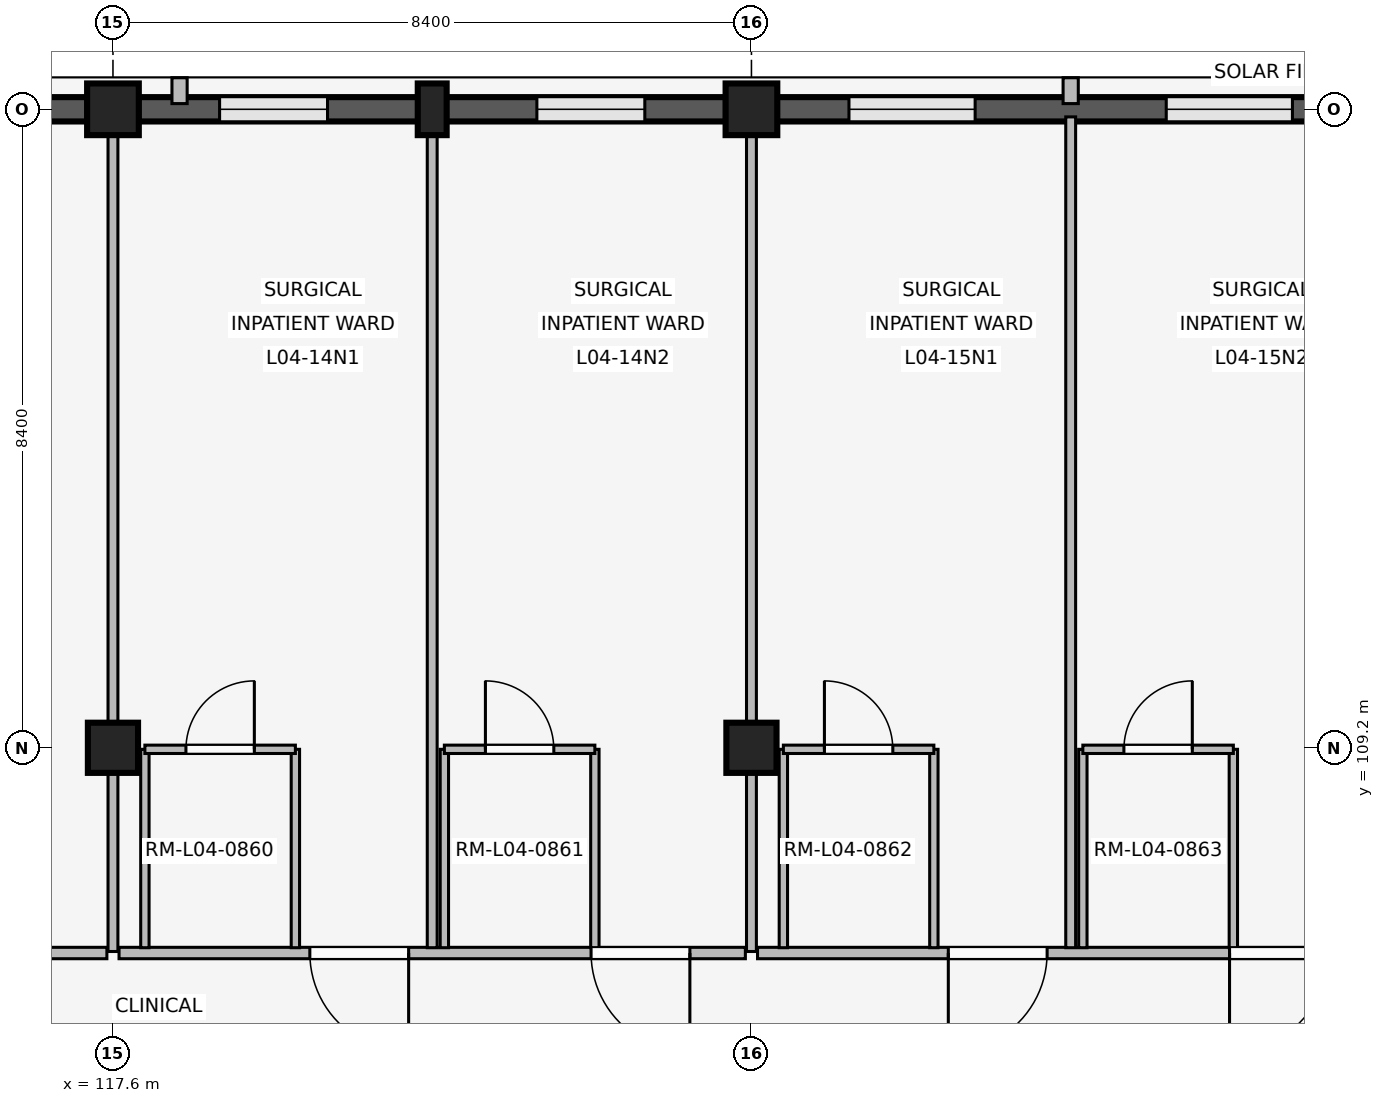
"""IFC4 building model, lengths in metres.
Left out: names, types, materials, properties, quantities, classifications, styles, units other than length and angle.
Written with IfcOpenShell. Run it as: python <this file> out.ifc"""

import sys

from ifc_helpers import new_model, si_unit, direction, frame, frame_2d, origin, origin_2d, place, context, subcontext, project, spatial, rectangle, extrude, element, fill, save


model = new_model("IFC4")
c1 = context("Model", 3, precision=1e-05, world=origin(), true_north=direction((0.0, 1.0)))
c2 = subcontext(c1, "Body", "Model", "MODEL_VIEW")
j1 = project(units=[si_unit("LENGTHUNIT", "METRE"), si_unit("PLANEANGLEUNIT", "RADIAN")], contexts=[c1])
p1 = place(None, origin())
s1 = spatial("IfcSite", under=j1, at=p1, CompositionType="ELEMENT")
p2 = place(p1, origin())
s2 = spatial("IfcBuilding", under=s1, at=p2, CompositionType="ELEMENT")
p3 = place(p2, frame((0.0, 0.0, 16.2)))
s3 = spatial("IfcBuildingStorey", under=s2, at=p3, CompositionType="ELEMENT", Elevation=16.2)
p4 = place(p3, frame((117.6, 109.2, 0.0), z_axis=(0.0, 0.0, 1.0), x_axis=(1.0, 0.0, 0.0)))
e1 = element("IfcColumn", 1, at=p4, inside=s3, PredefinedType="COLUMN", context=c2, shape_type="SweptSolid", body=[
    extrude(rectangle(XDim=0.66, YDim=0.66, at=origin_2d()), origin(), (0.0, 0.0, 1.0), 4.2),
])
p5 = place(p3, frame((117.6, 117.6, 0.0), z_axis=(0.0, 0.0, 1.0), x_axis=(1.0, 0.0, 0.0)))
e2 = element("IfcColumn", 2, at=p5, inside=s3, PredefinedType="COLUMN", context=c2, shape_type="SweptSolid", body=[
    extrude(rectangle(XDim=0.68, YDim=0.68, at=origin_2d()), origin(), (0.0, 0.0, 1.0), 4.2),
])
p6 = place(p3, frame((126.0, 109.2, 0.0), z_axis=(0.0, 0.0, 1.0), x_axis=(1.0, 0.0, 0.0)))
e3 = element("IfcColumn", 3, at=p6, inside=s3, PredefinedType="COLUMN", context=c2, shape_type="SweptSolid", body=[
    extrude(rectangle(XDim=0.66, YDim=0.66, at=origin_2d()), origin(), (0.0, 0.0, 1.0), 4.2),
])
p7 = place(p3, frame((126.0, 117.6, 0.0), z_axis=(0.0, 0.0, 1.0), x_axis=(1.0, 0.0, 0.0)))
e4 = element("IfcColumn", 4, at=p7, inside=s3, PredefinedType="COLUMN", context=c2, shape_type="SweptSolid", body=[
    extrude(rectangle(XDim=0.68, YDim=0.68, at=origin_2d()), origin(), (0.0, 0.0, 1.0), 4.2),
])
p8 = place(p3, frame((121.8, 117.6, 0.0), z_axis=(0.0, 0.0, 1.0), x_axis=(1.0, 0.0, 0.0)))
e5 = element("IfcColumn", 5, at=p8, inside=s3, PredefinedType="PILASTER", context=c2, shape_type="SweptSolid", body=[
    extrude(rectangle(XDim=0.38, YDim=0.68, at=origin_2d()), origin(), (0.0, 0.0, 1.0), 4.2),
])
p9 = place(p3, frame((109.535, 117.6, 0.0), z_axis=(0.0, 0.0, 1.0), x_axis=(1.0, 0.0, 0.0)))
e6 = element("IfcWall", 6, at=p9, inside=s3, PredefinedType="SOLIDWALL", context=c2, shape_type="SweptSolid", body=[
    extrude(rectangle(XDim=7.73, YDim=0.32, at=frame_2d((3.865, 0.0))), origin(), (0.0, 0.0, 1.0), 3.32),
])
p10 = place(p9, frame((1.038, 0.0, 0.85)))
e7 = element("IfcOpeningElement", 7, at=p10, cuts=e6, PredefinedType="OPENING", context=c2, shape_type="SweptSolid", body=[
    extrude(rectangle(XDim=1.48, YDim=1.6, at=frame_2d((0.74, 0.8))), frame((0.0, 0.17, 0.0), z_axis=(0.0, -1.0, 0.0), x_axis=(1.0, 0.0, 0.0)), (0.0, 0.0, 1.0), 0.34),
])
p11 = place(p9, frame((5.212, 0.0, 0.85)))
e8 = element("IfcOpeningElement", 8, at=p11, cuts=e6, PredefinedType="OPENING", context=c2, shape_type="SweptSolid", body=[
    extrude(rectangle(XDim=1.48, YDim=1.6, at=frame_2d((0.74, 0.8))), frame((0.0, 0.17, 0.0), z_axis=(0.0, -1.0, 0.0), x_axis=(1.0, 0.0, 0.0)), (0.0, 0.0, 1.0), 0.34),
])
p12 = place(p3, frame((117.935, 117.6, 0.0), z_axis=(0.0, 0.0, 1.0), x_axis=(1.0, 0.0, 0.0)))
e9 = element("IfcWall", 9, at=p12, inside=s3, PredefinedType="SOLIDWALL", context=c2, shape_type="SweptSolid", body=[
    extrude(rectangle(XDim=7.73, YDim=0.32, at=frame_2d((3.865, 0.0))), origin(), (0.0, 0.0, 1.0), 3.32),
])
p13 = place(p12, frame((1.068, 0.0, 0.85)))
e10 = element("IfcOpeningElement", 10, at=p13, cuts=e9, PredefinedType="OPENING", context=c2, shape_type="SweptSolid", body=[
    extrude(rectangle(XDim=1.42, YDim=1.45, at=frame_2d((0.71, 0.725))), frame((0.0, 0.17, 0.0), z_axis=(0.0, -1.0, 0.0), x_axis=(1.0, 0.0, 0.0)), (0.0, 0.0, 1.0), 0.34),
])
p14 = place(p12, frame((5.242, 0.0, 0.85)))
e11 = element("IfcOpeningElement", 11, at=p14, cuts=e9, PredefinedType="OPENING", context=c2, shape_type="SweptSolid", body=[
    extrude(rectangle(XDim=1.42, YDim=1.45, at=frame_2d((0.71, 0.725))), frame((0.0, 0.17, 0.0), z_axis=(0.0, -1.0, 0.0), x_axis=(1.0, 0.0, 0.0)), (0.0, 0.0, 1.0), 0.34),
])
p15 = place(p3, frame((118.476, 117.675, 0.0), z_axis=(0.0, 0.0, 1.0), x_axis=(0.0, 1.0, 0.0)))
e12 = element("IfcWall", 12, at=p15, inside=s3, PredefinedType="ELEMENTEDWALL", context=c2, shape_type="SweptSolid", body=[
    extrude(rectangle(XDim=0.34, YDim=0.2, at=frame_2d((0.17, 0.0))), origin(), (0.0, 0.0, 1.0), 3.3),
])
p16 = place(p3, frame((126.335, 117.6, 0.0), z_axis=(0.0, 0.0, 1.0), x_axis=(1.0, 0.0, 0.0)))
e13 = element("IfcWall", 13, at=p16, inside=s3, PredefinedType="SOLIDWALL", context=c2, shape_type="SweptSolid", body=[
    extrude(rectangle(XDim=7.73, YDim=0.32, at=frame_2d((3.865, 0.0))), origin(), (0.0, 0.0, 1.0), 3.32),
])
p17 = place(p16, frame((0.948, 0.0, 0.85)))
e14 = element("IfcOpeningElement", 14, at=p17, cuts=e13, PredefinedType="OPENING", context=c2, shape_type="SweptSolid", body=[
    extrude(rectangle(XDim=1.66, YDim=1.95, at=frame_2d((0.83, 0.975))), frame((0.0, 0.17, 0.0), z_axis=(0.0, -1.0, 0.0), x_axis=(1.0, 0.0, 0.0)), (0.0, 0.0, 1.0), 0.34),
])
p18 = place(p16, frame((5.122, 0.0, 0.85)))
e15 = element("IfcOpeningElement", 15, at=p18, cuts=e13, PredefinedType="OPENING", context=c2, shape_type="SweptSolid", body=[
    extrude(rectangle(XDim=1.66, YDim=1.95, at=frame_2d((0.83, 0.975))), frame((0.0, 0.17, 0.0), z_axis=(0.0, -1.0, 0.0), x_axis=(1.0, 0.0, 0.0)), (0.0, 0.0, 1.0), 0.34),
])
p19 = place(p3, frame((130.2, 117.675, 0.0), z_axis=(0.0, 0.0, 1.0), x_axis=(0.0, 1.0, 0.0)))
e16 = element("IfcWall", 16, at=p19, inside=s3, PredefinedType="ELEMENTEDWALL", context=c2, shape_type="SweptSolid", body=[
    extrude(rectangle(XDim=0.34, YDim=0.2, at=frame_2d((0.17, 0.0))), origin(), (0.0, 0.0, 1.0), 3.3),
])
p20 = place(p3, frame((117.52, 106.5, 0.0), z_axis=(0.0, 0.0, 1.0), x_axis=(-1.0, 0.0, 0.0)))
e17 = element("IfcWall", 17, at=p20, inside=s3, PredefinedType="PARTITIONING", context=c2, shape_type="SweptSolid", body=[
    extrude(rectangle(XDim=8.24, YDim=0.15, at=frame_2d((4.12, 0.0))), origin(), (0.0, 0.0, 1.0), 3.3),
])
p21 = place(p20, frame((3.495, 0.0, 0.0)))
e18 = element("IfcOpeningElement", 18, at=p21, cuts=e17, PredefinedType="OPENING", context=c2, shape_type="SweptSolid", body=[
    extrude(rectangle(XDim=1.25, YDim=2.2, at=frame_2d((0.625, 1.1))), frame((0.0, 0.085, 0.0), z_axis=(0.0, -1.0, 0.0), x_axis=(1.0, 0.0, 0.0)), (0.0, 0.0, 1.0), 0.17),
])
p22 = place(p3, frame((117.6, 106.52, 0.0), z_axis=(0.0, 0.0, 1.0), x_axis=(0.0, 1.0, 0.0)))
e19 = element("IfcWall", 19, at=p22, inside=s3, PredefinedType="PARTITIONING", context=c2, shape_type="SweptSolid", body=[
    extrude(rectangle(XDim=10.94, YDim=0.13, at=frame_2d((5.47, 0.0))), origin(), (0.0, 0.0, 1.0), 3.3),
])
p23 = place(p3, frame((125.92, 106.5, 0.0), z_axis=(0.0, 0.0, 1.0), x_axis=(-1.0, 0.0, 0.0)))
e20 = element("IfcWall", 20, at=p23, inside=s3, PredefinedType="PARTITIONING", context=c2, shape_type="SweptSolid", body=[
    extrude(rectangle(XDim=8.24, YDim=0.15, at=frame_2d((4.12, 0.0))), origin(), (0.0, 0.0, 1.0), 3.3),
])
p24 = place(p23, frame((0.73, 0.0, 0.0)))
e21 = element("IfcOpeningElement", 21, at=p24, cuts=e20, PredefinedType="OPENING", context=c2, shape_type="SweptSolid", body=[
    extrude(rectangle(XDim=1.3, YDim=2.25, at=frame_2d((0.65, 1.125))), frame((0.0, 0.085, 0.0), z_axis=(0.0, -1.0, 0.0), x_axis=(1.0, 0.0, 0.0)), (0.0, 0.0, 1.0), 0.17),
])
p25 = place(p23, frame((4.43, 0.0, 0.0)))
e22 = element("IfcOpeningElement", 22, at=p25, cuts=e20, PredefinedType="OPENING", context=c2, shape_type="SweptSolid", body=[
    extrude(rectangle(XDim=1.3, YDim=2.25, at=frame_2d((0.65, 1.125))), frame((0.0, 0.085, 0.0), z_axis=(0.0, -1.0, 0.0), x_axis=(1.0, 0.0, 0.0)), (0.0, 0.0, 1.0), 0.17),
])
p26 = place(p3, frame((121.8, 106.57, 0.0), z_axis=(0.0, 0.0, 1.0), x_axis=(0.0, 1.0, 0.0)))
e23 = element("IfcWall", 23, at=p26, inside=s3, PredefinedType="PARTITIONING", context=c2, shape_type="SweptSolid", body=[
    extrude(rectangle(XDim=10.93, YDim=0.13, at=frame_2d((5.465, 0.0))), origin(), (0.0, 0.0, 1.0), 3.3),
])
for number, where, z_axis, x_axis in (
    (24, (118.02, 106.57, 0.0), (0.0, 0.0, 1.0), (0.0, 1.0, 0.0)),
    (25, (120.0, 106.57, 0.0), (0.0, 0.0, 1.0), (0.0, 1.0, 0.0)),
):
    element("IfcWall", number, at=place(p3, frame(where, z_axis=z_axis, x_axis=x_axis)), inside=s3, PredefinedType="PARTITIONING", context=c2, shape_type="SweptSolid", body=[
        extrude(rectangle(XDim=2.61, YDim=0.11, at=frame_2d((1.305, 0.0))), origin(), (0.0, 0.0, 1.0), 3.3),
    ])
p27 = place(p3, frame((118.02, 109.18, 0.0), z_axis=(0.0, 0.0, 1.0), x_axis=(1.0, 0.0, 0.0)))
e26 = element("IfcWall", 26, at=p27, inside=s3, PredefinedType="PARTITIONING", context=c2, shape_type="SweptSolid", body=[
    extrude(rectangle(XDim=1.98, YDim=0.11, at=frame_2d((0.99, 0.0))), origin(), (0.0, 0.0, 1.0), 3.3),
])
p28 = place(p27, frame((0.54, 0.0, 0.0)))
e27 = element("IfcOpeningElement", 27, at=p28, cuts=e26, PredefinedType="OPENING", context=c2, shape_type="SweptSolid", body=[
    extrude(rectangle(XDim=0.9, YDim=2.1, at=frame_2d((0.45, 1.05))), frame((0.0, 0.065, 0.0), z_axis=(0.0, -1.0, 0.0), x_axis=(1.0, 0.0, 0.0)), (0.0, 0.0, 1.0), 0.13),
])
for number, where, z_axis, x_axis in (
    (28, (121.96, 106.57, 0.0), (0.0, 0.0, 1.0), (0.0, 1.0, 0.0)),
    (29, (123.94, 106.57, 0.0), (0.0, 0.0, 1.0), (0.0, 1.0, 0.0)),
):
    element("IfcWall", number, at=place(p3, frame(where, z_axis=z_axis, x_axis=x_axis)), inside=s3, PredefinedType="PARTITIONING", context=c2, shape_type="SweptSolid", body=[
        extrude(rectangle(XDim=2.61, YDim=0.11, at=frame_2d((1.305, 0.0))), origin(), (0.0, 0.0, 1.0), 3.3),
    ])
p29 = place(p3, frame((121.96, 109.18, 0.0), z_axis=(0.0, 0.0, 1.0), x_axis=(1.0, 0.0, 0.0)))
e30 = element("IfcWall", 30, at=p29, inside=s3, PredefinedType="PARTITIONING", context=c2, shape_type="SweptSolid", body=[
    extrude(rectangle(XDim=1.98, YDim=0.11, at=frame_2d((0.99, 0.0))), origin(), (0.0, 0.0, 1.0), 3.3),
])
p30 = place(p29, frame((0.54, 0.0, 0.0)))
e31 = element("IfcOpeningElement", 31, at=p30, cuts=e30, PredefinedType="OPENING", context=c2, shape_type="SweptSolid", body=[
    extrude(rectangle(XDim=0.9, YDim=2.1, at=frame_2d((0.45, 1.05))), frame((0.0, 0.065, 0.0), z_axis=(0.0, -1.0, 0.0), x_axis=(1.0, 0.0, 0.0)), (0.0, 0.0, 1.0), 0.13),
])
p31 = place(p3, frame((126.0, 106.52, 0.0), z_axis=(0.0, 0.0, 1.0), x_axis=(0.0, 1.0, 0.0)))
e32 = element("IfcWall", 32, at=p31, inside=s3, PredefinedType="PARTITIONING", context=c2, shape_type="SweptSolid", body=[
    extrude(rectangle(XDim=10.94, YDim=0.13, at=frame_2d((5.47, 0.0))), origin(), (0.0, 0.0, 1.0), 3.3),
])
p32 = place(p3, frame((134.26, 106.5, 0.0), z_axis=(0.0, 0.0, 1.0), x_axis=(-1.0, 0.0, 0.0)))
e33 = element("IfcWall", 33, at=p32, inside=s3, PredefinedType="PARTITIONING", context=c2, shape_type="SweptSolid", body=[
    extrude(rectangle(XDim=8.18, YDim=0.15, at=frame_2d((4.09, 0.0))), origin(), (0.0, 0.0, 1.0), 3.3),
])
p33 = place(p32, frame((0.67, 0.0, 0.0)))
e34 = element("IfcOpeningElement", 34, at=p33, cuts=e33, PredefinedType="OPENING", context=c2, shape_type="SweptSolid", body=[
    extrude(rectangle(XDim=1.3, YDim=2.25, at=frame_2d((0.65, 1.125))), frame((0.0, 0.085, 0.0), z_axis=(0.0, -1.0, 0.0), x_axis=(1.0, 0.0, 0.0)), (0.0, 0.0, 1.0), 0.17),
])
p34 = place(p32, frame((4.37, 0.0, 0.0)))
e35 = element("IfcOpeningElement", 35, at=p34, cuts=e33, PredefinedType="OPENING", context=c2, shape_type="SweptSolid", body=[
    extrude(rectangle(XDim=1.3, YDim=2.25, at=frame_2d((0.65, 1.125))), frame((0.0, 0.085, 0.0), z_axis=(0.0, -1.0, 0.0), x_axis=(1.0, 0.0, 0.0)), (0.0, 0.0, 1.0), 0.17),
])
p35 = place(p3, frame((130.2, 106.57, 0.0), z_axis=(0.0, 0.0, 1.0), x_axis=(0.0, 1.0, 0.0)))
e36 = element("IfcWall", 36, at=p35, inside=s3, PredefinedType="PARTITIONING", context=c2, shape_type="SweptSolid", body=[
    extrude(rectangle(XDim=10.93, YDim=0.13, at=frame_2d((5.465, 0.0))), origin(), (0.0, 0.0, 1.0), 3.3),
])
for number, where, z_axis, x_axis in (
    (37, (126.42, 106.57, 0.0), (0.0, 0.0, 1.0), (0.0, 1.0, 0.0)),
    (38, (128.4, 106.57, 0.0), (0.0, 0.0, 1.0), (0.0, 1.0, 0.0)),
):
    element("IfcWall", number, at=place(p3, frame(where, z_axis=z_axis, x_axis=x_axis)), inside=s3, PredefinedType="PARTITIONING", context=c2, shape_type="SweptSolid", body=[
        extrude(rectangle(XDim=2.61, YDim=0.11, at=frame_2d((1.305, 0.0))), origin(), (0.0, 0.0, 1.0), 3.3),
    ])
p36 = place(p3, frame((126.42, 109.18, 0.0), z_axis=(0.0, 0.0, 1.0), x_axis=(1.0, 0.0, 0.0)))
e39 = element("IfcWall", 39, at=p36, inside=s3, PredefinedType="PARTITIONING", context=c2, shape_type="SweptSolid", body=[
    extrude(rectangle(XDim=1.98, YDim=0.11, at=frame_2d((0.99, 0.0))), origin(), (0.0, 0.0, 1.0), 3.3),
])
p37 = place(p36, frame((0.54, 0.0, 0.0)))
e40 = element("IfcOpeningElement", 40, at=p37, cuts=e39, PredefinedType="OPENING", context=c2, shape_type="SweptSolid", body=[
    extrude(rectangle(XDim=0.9, YDim=2.1, at=frame_2d((0.45, 1.05))), frame((0.0, 0.065, 0.0), z_axis=(0.0, -1.0, 0.0), x_axis=(1.0, 0.0, 0.0)), (0.0, 0.0, 1.0), 0.13),
])
for number, where, z_axis, x_axis in (
    (41, (130.36, 106.57, 0.0), (0.0, 0.0, 1.0), (0.0, 1.0, 0.0)),
    (42, (132.34, 106.57, 0.0), (0.0, 0.0, 1.0), (0.0, 1.0, 0.0)),
):
    element("IfcWall", number, at=place(p3, frame(where, z_axis=z_axis, x_axis=x_axis)), inside=s3, PredefinedType="PARTITIONING", context=c2, shape_type="SweptSolid", body=[
        extrude(rectangle(XDim=2.61, YDim=0.11, at=frame_2d((1.305, 0.0))), origin(), (0.0, 0.0, 1.0), 3.3),
    ])
p38 = place(p3, frame((130.36, 109.18, 0.0), z_axis=(0.0, 0.0, 1.0), x_axis=(1.0, 0.0, 0.0)))
e43 = element("IfcWall", 43, at=p38, inside=s3, PredefinedType="PARTITIONING", context=c2, shape_type="SweptSolid", body=[
    extrude(rectangle(XDim=1.98, YDim=0.11, at=frame_2d((0.99, 0.0))), origin(), (0.0, 0.0, 1.0), 3.3),
])
p39 = place(p38, frame((0.54, 0.0, 0.0)))
e44 = element("IfcOpeningElement", 44, at=p39, cuts=e43, PredefinedType="OPENING", context=c2, shape_type="SweptSolid", body=[
    extrude(rectangle(XDim=0.9, YDim=2.1, at=frame_2d((0.45, 1.05))), frame((0.0, 0.065, 0.0), z_axis=(0.0, -1.0, 0.0), x_axis=(1.0, 0.0, 0.0)), (0.0, 0.0, 1.0), 0.13),
])
p40 = place(p13, origin())
e45 = element("IfcWindow", 45, at=p40, inside=s3, PartitioningType="SINGLE_PANEL", PredefinedType="WINDOW", context=c2, shape_type="SweptSolid", body=[
    extrude(rectangle(XDim=1.42, YDim=1.45, at=frame_2d((0.71, 0.725))), frame((0.0, 0.03, 0.0), z_axis=(0.0, -1.0, 0.0), x_axis=(1.0, 0.0, 0.0)), (0.0, 0.0, 1.0), 0.06),
])
fill(e10, e45)
p41 = place(p14, origin())
e46 = element("IfcWindow", 46, at=p41, inside=s3, PartitioningType="SINGLE_PANEL", PredefinedType="WINDOW", context=c2, shape_type="SweptSolid", body=[
    extrude(rectangle(XDim=1.42, YDim=1.45, at=frame_2d((0.71, 0.725))), frame((0.0, 0.03, 0.0), z_axis=(0.0, -1.0, 0.0), x_axis=(1.0, 0.0, 0.0)), (0.0, 0.0, 1.0), 0.06),
])
fill(e11, e46)
p42 = place(p17, origin())
e47 = element("IfcWindow", 47, at=p42, inside=s3, PartitioningType="SINGLE_PANEL", PredefinedType="WINDOW", context=c2, shape_type="SweptSolid", body=[
    extrude(rectangle(XDim=1.66, YDim=1.95, at=frame_2d((0.83, 0.975))), frame((0.0, 0.03, 0.0), z_axis=(0.0, -1.0, 0.0), x_axis=(1.0, 0.0, 0.0)), (0.0, 0.0, 1.0), 0.06),
])
fill(e14, e47)
p43 = place(p18, origin())
e48 = element("IfcWindow", 48, at=p43, inside=s3, PartitioningType="SINGLE_PANEL", PredefinedType="WINDOW", context=c2, shape_type="SweptSolid", body=[
    extrude(rectangle(XDim=1.66, YDim=1.95, at=frame_2d((0.83, 0.975))), frame((0.0, 0.03, 0.0), z_axis=(0.0, -1.0, 0.0), x_axis=(1.0, 0.0, 0.0)), (0.0, 0.0, 1.0), 0.06),
])
fill(e15, e48)
p44 = place(p24, origin())
e49 = element("IfcDoor", 49, at=p44, inside=s3, OperationType="SINGLE_SWING_LEFT", PredefinedType="DOOR", context=c2, shape_type="SweptSolid", body=[
    extrude(rectangle(XDim=1.3, YDim=2.25, at=frame_2d((0.65, 1.125))), frame((0.0, 0.025, 0.0), z_axis=(0.0, -1.0, 0.0), x_axis=(1.0, 0.0, 0.0)), (0.0, 0.0, 1.0), 0.05),
])
fill(e21, e49)
p45 = place(p25, origin())
e50 = element("IfcDoor", 50, at=p45, inside=s3, OperationType="SINGLE_SWING_LEFT", PredefinedType="DOOR", context=c2, shape_type="SweptSolid", body=[
    extrude(rectangle(XDim=1.3, YDim=2.25, at=frame_2d((0.65, 1.125))), frame((0.0, 0.025, 0.0), z_axis=(0.0, -1.0, 0.0), x_axis=(1.0, 0.0, 0.0)), (0.0, 0.0, 1.0), 0.05),
])
fill(e22, e50)
p46 = place(p28, origin())
e51 = element("IfcDoor", 51, at=p46, inside=s3, OperationType="SINGLE_SWING_RIGHT", PredefinedType="DOOR", context=c2, shape_type="SweptSolid", body=[
    extrude(rectangle(XDim=0.9, YDim=2.1, at=frame_2d((0.45, 1.05))), frame((0.0, 0.025, 0.0), z_axis=(0.0, -1.0, 0.0), x_axis=(1.0, 0.0, 0.0)), (0.0, 0.0, 1.0), 0.05),
])
fill(e27, e51)
p47 = place(p30, origin())
e52 = element("IfcDoor", 52, at=p47, inside=s3, OperationType="SINGLE_SWING_LEFT", PredefinedType="DOOR", context=c2, shape_type="SweptSolid", body=[
    extrude(rectangle(XDim=0.9, YDim=2.1, at=frame_2d((0.45, 1.05))), frame((0.0, 0.025, 0.0), z_axis=(0.0, -1.0, 0.0), x_axis=(1.0, 0.0, 0.0)), (0.0, 0.0, 1.0), 0.05),
])
fill(e31, e52)
p48 = place(p33, origin())
e53 = element("IfcDoor", 53, at=p48, inside=s3, OperationType="SINGLE_SWING_RIGHT", PredefinedType="DOOR", context=c2, shape_type="SweptSolid", body=[
    extrude(rectangle(XDim=1.3, YDim=2.25, at=frame_2d((0.65, 1.125))), frame((0.0, 0.025, 0.0), z_axis=(0.0, -1.0, 0.0), x_axis=(1.0, 0.0, 0.0)), (0.0, 0.0, 1.0), 0.05),
])
fill(e34, e53)
p49 = place(p34, origin())
e54 = element("IfcDoor", 54, at=p49, inside=s3, OperationType="SINGLE_SWING_RIGHT", PredefinedType="DOOR", context=c2, shape_type="SweptSolid", body=[
    extrude(rectangle(XDim=1.3, YDim=2.25, at=frame_2d((0.65, 1.125))), frame((0.0, 0.025, 0.0), z_axis=(0.0, -1.0, 0.0), x_axis=(1.0, 0.0, 0.0)), (0.0, 0.0, 1.0), 0.05),
])
fill(e35, e54)
p50 = place(p37, origin())
e55 = element("IfcDoor", 55, at=p50, inside=s3, OperationType="SINGLE_SWING_LEFT", PredefinedType="DOOR", context=c2, shape_type="SweptSolid", body=[
    extrude(rectangle(XDim=0.9, YDim=2.1, at=frame_2d((0.45, 1.05))), frame((0.0, 0.025, 0.0), z_axis=(0.0, -1.0, 0.0), x_axis=(1.0, 0.0, 0.0)), (0.0, 0.0, 1.0), 0.05),
])
fill(e40, e55)
p51 = place(p39, origin())
e56 = element("IfcDoor", 56, at=p51, inside=s3, OperationType="SINGLE_SWING_RIGHT", PredefinedType="DOOR", context=c2, shape_type="SweptSolid", body=[
    extrude(rectangle(XDim=0.9, YDim=2.1, at=frame_2d((0.45, 1.05))), frame((0.0, 0.025, 0.0), z_axis=(0.0, -1.0, 0.0), x_axis=(1.0, 0.0, 0.0)), (0.0, 0.0, 1.0), 0.05),
])
fill(e44, e56)
save(model, sys.argv[1])
